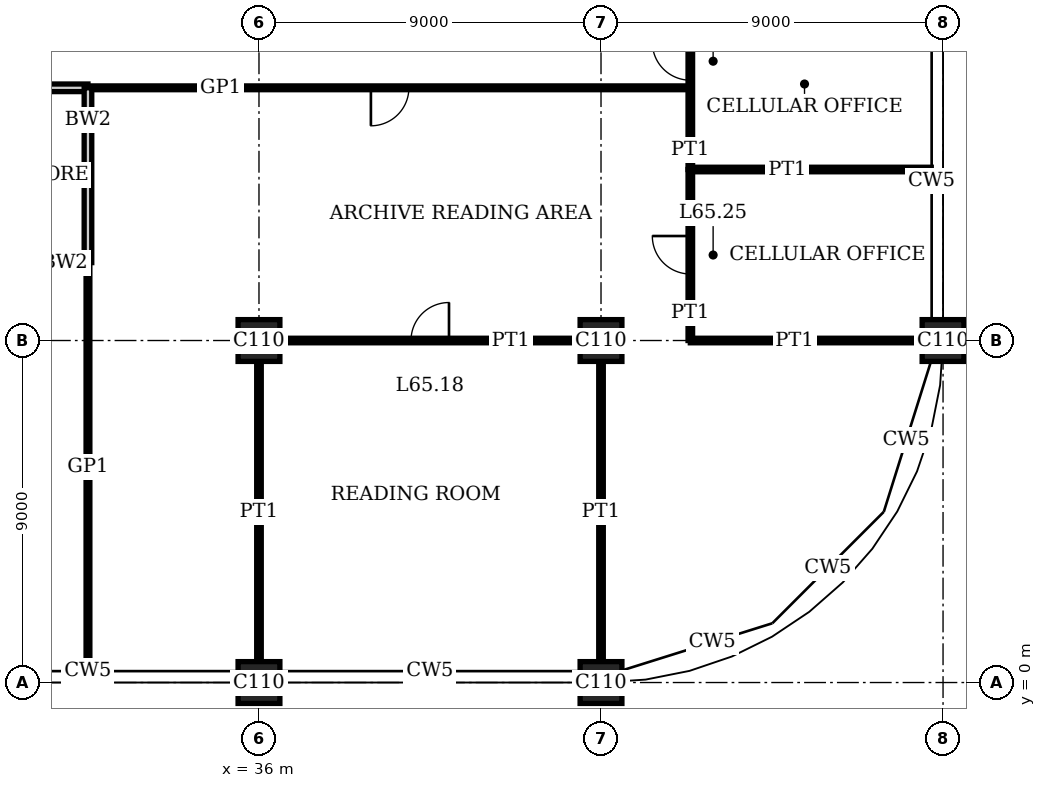
"""IFC4 building model, lengths in metres.
Left out: names, types, materials, properties, quantities, classifications, styles, units other than length and angle.
Written with IfcOpenShell. Run it as: python <this file> out.ifc"""

import sys

from ifc_helpers import new_model, si_unit, direction, frame, frame_2d, origin, origin_2d, place, context, subcontext, project, spatial, rectangle, extrude, element, fill, save


model = new_model("IFC4")
c1 = context("Model", 3, precision=1e-05, world=origin(), true_north=direction((0.0, 1.0)))
c2 = subcontext(c1, "Body", "Model", "MODEL_VIEW")
j1 = project(units=[si_unit("LENGTHUNIT", "METRE"), si_unit("PLANEANGLEUNIT", "RADIAN")], contexts=[c1])
p1 = place(None, origin())
s1 = spatial("IfcSite", under=j1, at=p1, CompositionType="ELEMENT")
p2 = place(p1, origin())
s2 = spatial("IfcBuilding", under=s1, at=p2, CompositionType="ELEMENT")
p3 = place(p2, frame((0.0, 0.0, 267.4)))
s3 = spatial("IfcBuildingStorey", under=s2, at=p3, CompositionType="ELEMENT", Elevation=267.4)
for number, where, z_axis, x_axis in (
    (1, (36.0, 0.0, 0.0), (0.0, 0.0, 1.0), (1.0, 0.0, 0.0)),
    (2, (36.0, 9.0, 0.0), (0.0, 0.0, 1.0), (1.0, 0.0, 0.0)),
    (3, (45.0, 0.0, 0.0), (0.0, 0.0, 1.0), (1.0, 0.0, 0.0)),
    (4, (45.0, 9.0, 0.0), (0.0, 0.0, 1.0), (1.0, 0.0, 0.0)),
    (5, (54.0, 9.0, 0.0), (0.0, 0.0, 1.0), (1.0, 0.0, 0.0)),
):
    element("IfcColumn", number, at=place(p3, frame(where, z_axis=z_axis, x_axis=x_axis)), inside=s3, PredefinedType="COLUMN", context=c2, shape_type="SweptSolid", body=[
        extrude(rectangle(XDim=1.1, YDim=1.1, at=origin_2d()), origin(), (0.0, 0.0, 1.0), 4.0),
    ])
p4 = place(p3, frame((36.55, 9.0, 0.0), z_axis=(0.0, 0.0, 1.0), x_axis=(1.0, 0.0, 0.0)))
e6 = element("IfcWall", 6, at=p4, inside=s3, PredefinedType="PARTITIONING", context=c2, shape_type="SweptSolid", body=[
    extrude(rectangle(XDim=7.9, YDim=0.12, at=frame_2d((3.95, 0.0))), origin(), (0.0, 0.0, 1.0), 3.05),
])
p5 = place(p4, frame((3.45, 0.0, 0.0)))
e7 = element("IfcOpeningElement", 7, at=p5, cuts=e6, PredefinedType="OPENING", context=c2, shape_type="SweptSolid", body=[
    extrude(rectangle(XDim=1.0, YDim=2.4, at=frame_2d((0.5, 1.2))), frame((0.0, 0.07, 0.0), z_axis=(0.0, -1.0, 0.0), x_axis=(1.0, 0.0, 0.0)), (0.0, 0.0, 1.0), 0.14),
])
p6 = place(p3, frame((47.35, 9.0, 0.0), z_axis=(0.0, 0.0, 1.0), x_axis=(1.0, 0.0, 0.0)))
e8 = element("IfcWall", 8, at=p6, inside=s3, PredefinedType="PARTITIONING", context=c2, shape_type="SweptSolid", body=[
    extrude(rectangle(XDim=6.1, YDim=0.12, at=frame_2d((3.05, 0.0))), origin(), (0.0, 0.0, 1.0), 3.05),
])
p7 = place(p3, frame((27.0, 11.05, 0.0), z_axis=(0.0, 0.0, 1.0), x_axis=(1.0, 0.0, 0.0)))
e9 = element("IfcWall", 9, at=p7, inside=s3, PredefinedType="SOLIDWALL", context=c2, shape_type="SweptSolid", body=[
    extrude(rectangle(XDim=4.5, YDim=0.2, at=frame_2d((2.25, 0.0))), origin(), (0.0, 0.0, 1.0), 3.75),
])
p8 = place(p7, frame((1.75, 0.0, 0.0)))
e10 = element("IfcOpeningElement", 10, at=p8, cuts=e9, PredefinedType="OPENING", context=c2, shape_type="SweptSolid", body=[
    extrude(rectangle(XDim=1.0, YDim=2.4, at=frame_2d((0.5, 1.2))), frame((0.0, 0.11, 0.0), z_axis=(0.0, -1.0, 0.0), x_axis=(1.0, 0.0, 0.0)), (0.0, 0.0, 1.0), 0.22),
])
p9 = place(p3, frame((47.35, 13.5, 0.0), z_axis=(0.0, 0.0, 1.0), x_axis=(1.0, 0.0, 0.0)))
e11 = element("IfcWall", 11, at=p9, inside=s3, PredefinedType="PARTITIONING", context=c2, shape_type="SweptSolid", body=[
    extrude(rectangle(XDim=6.34, YDim=0.12, at=frame_2d((3.17, 0.0))), origin(), (0.0, 0.0, 1.0), 3.1),
])
p10 = place(p3, frame((27.0, 15.65, 0.0), z_axis=(0.0, 0.0, 1.0), x_axis=(1.0, 0.0, 0.0)))
e12 = element("IfcWall", 12, at=p10, inside=s3, PredefinedType="SOLIDWALL", context=c2, shape_type="SweptSolid", body=[
    extrude(rectangle(XDim=4.5, YDim=0.2, at=frame_2d((2.25, 0.0))), origin(), (0.0, 0.0, 1.0), 3.75),
])
p11 = place(p3, frame((31.55, 15.65, 0.0), z_axis=(0.0, 0.0, 1.0), x_axis=(1.0, 0.0, 0.0)))
e13 = element("IfcWall", 13, at=p11, inside=s3, PredefinedType="PARTITIONING", context=c2, shape_type="SweptSolid", body=[
    extrude(rectangle(XDim=15.79, YDim=0.1, at=frame_2d((7.895, 0.0))), origin(), (0.0, 0.0, 1.0), 3.75),
])
p12 = place(p11, frame((7.395, 0.0, 0.0)))
e14 = element("IfcOpeningElement", 14, at=p12, cuts=e13, PredefinedType="OPENING", context=c2, shape_type="SweptSolid", body=[
    extrude(rectangle(XDim=1.0, YDim=2.4, at=frame_2d((0.5, 1.2))), frame((0.0, 0.06, 0.0), z_axis=(0.0, -1.0, 0.0), x_axis=(1.0, 0.0, 0.0)), (0.0, 0.0, 1.0), 0.12),
])
p13 = place(p3, frame((31.5, 11.05, 0.0), z_axis=(0.0, 0.0, 1.0), x_axis=(0.0, 1.0, 0.0)))
e15 = element("IfcWall", 15, at=p13, inside=s3, PredefinedType="SOLIDWALL", context=c2, shape_type="SweptSolid", body=[
    extrude(rectangle(XDim=4.6, YDim=0.2, at=frame_2d((2.3, 0.0))), origin(), (0.0, 0.0, 1.0), 3.75),
])
p14 = place(p3, frame((31.5, 0.31, 0.0), z_axis=(0.0, 0.0, 1.0), x_axis=(0.0, 1.0, 0.0)))
e16 = element("IfcWall", 16, at=p14, inside=s3, PredefinedType="PARTITIONING", context=c2, shape_type="SweptSolid", body=[
    extrude(rectangle(XDim=10.74, YDim=0.1, at=frame_2d((5.37, 0.0))), origin(), (0.0, 0.0, 1.0), 3.75),
])
for number, where, z_axis, x_axis in (
    (17, (36.0, 0.55, 0.0), (0.0, 0.0, 1.0), (0.0, 1.0, 0.0)),
    (18, (45.0, 0.55, 0.0), (0.0, 0.0, 1.0), (0.0, 1.0, 0.0)),
):
    element("IfcWall", number, at=place(p3, frame(where, z_axis=z_axis, x_axis=x_axis)), inside=s3, PredefinedType="PARTITIONING", context=c2, shape_type="SweptSolid", body=[
        extrude(rectangle(XDim=7.9, YDim=0.12, at=frame_2d((3.95, 0.0))), origin(), (0.0, 0.0, 1.0), 3.05),
    ])
p15 = place(p3, frame((47.35, 9.0, 0.0), z_axis=(0.0, 0.0, 1.0), x_axis=(0.0, 1.0, 0.0)))
e19 = element("IfcWall", 19, at=p15, inside=s3, PredefinedType="PARTITIONING", context=c2, shape_type="SweptSolid", body=[
    extrude(rectangle(XDim=4.5, YDim=0.12, at=frame_2d((2.25, 0.0))), origin(), (0.0, 0.0, 1.0), 3.75),
])
p16 = place(p15, frame((1.75, 0.0, 0.0)))
e20 = element("IfcOpeningElement", 20, at=p16, cuts=e19, PredefinedType="OPENING", context=c2, shape_type="SweptSolid", body=[
    extrude(rectangle(XDim=1.0, YDim=2.4, at=frame_2d((0.5, 1.2))), frame((0.0, 0.07, 0.0), z_axis=(0.0, -1.0, 0.0), x_axis=(1.0, 0.0, 0.0)), (0.0, 0.0, 1.0), 0.14),
])
p17 = place(p3, frame((47.35, 13.5, 0.0), z_axis=(0.0, 0.0, 1.0), x_axis=(0.0, 1.0, 0.0)))
e21 = element("IfcWall", 21, at=p17, inside=s3, PredefinedType="PARTITIONING", context=c2, shape_type="SweptSolid", body=[
    extrude(rectangle(XDim=4.5, YDim=0.12, at=frame_2d((2.25, 0.0))), origin(), (0.0, 0.0, 1.0), 3.75),
])
p18 = place(p17, frame((2.35, 0.0, 0.0)))
e22 = element("IfcOpeningElement", 22, at=p18, cuts=e21, PredefinedType="OPENING", context=c2, shape_type="SweptSolid", body=[
    extrude(rectangle(XDim=1.0, YDim=2.4, at=frame_2d((0.5, 1.2))), frame((0.0, 0.07, 0.0), z_axis=(0.0, -1.0, 0.0), x_axis=(1.0, 0.0, 0.0)), (0.0, 0.0, 1.0), 0.14),
])
p19 = place(p5, origin())
e23 = element("IfcDoor", 23, at=p19, inside=s3, OperationType="SINGLE_SWING_LEFT", PredefinedType="DOOR", context=c2, shape_type="SweptSolid", body=[
    extrude(rectangle(XDim=1.0, YDim=2.4, at=frame_2d((0.5, 1.2))), frame((0.0, 0.025, 0.0), z_axis=(0.0, -1.0, 0.0), x_axis=(1.0, 0.0, 0.0)), (0.0, 0.0, 1.0), 0.05),
])
fill(e7, e23)
p20 = place(p12, origin())
e24 = element("IfcDoor", 24, at=p20, inside=s3, OperationType="SINGLE_SWING_LEFT", PredefinedType="DOOR", context=c2, shape_type="SweptSolid", body=[
    extrude(rectangle(XDim=1.0, YDim=2.4, at=frame_2d((0.5, 1.2))), frame((0.0, 0.02, 0.0), z_axis=(0.0, -1.0, 0.0), x_axis=(1.0, 0.0, 0.0)), (0.0, 0.0, 1.0), 0.04),
])
fill(e14, e24)
p21 = place(p16, origin())
e25 = element("IfcDoor", 25, at=p21, inside=s3, OperationType="SINGLE_SWING_LEFT", PredefinedType="DOOR", context=c2, shape_type="SweptSolid", body=[
    extrude(rectangle(XDim=1.0, YDim=2.4, at=frame_2d((0.5, 1.2))), frame((0.0, 0.025, 0.0), z_axis=(0.0, -1.0, 0.0), x_axis=(1.0, 0.0, 0.0)), (0.0, 0.0, 1.0), 0.05),
])
fill(e20, e25)
p22 = place(p18, origin())
e26 = element("IfcDoor", 26, at=p22, inside=s3, OperationType="SINGLE_SWING_LEFT", PredefinedType="DOOR", context=c2, shape_type="SweptSolid", body=[
    extrude(rectangle(XDim=1.0, YDim=2.4, at=frame_2d((0.5, 1.2))), frame((0.0, 0.025, 0.0), z_axis=(0.0, -1.0, 0.0), x_axis=(1.0, 0.0, 0.0)), (0.0, 0.0, 1.0), 0.05),
])
fill(e22, e26)
save(model, sys.argv[1])
